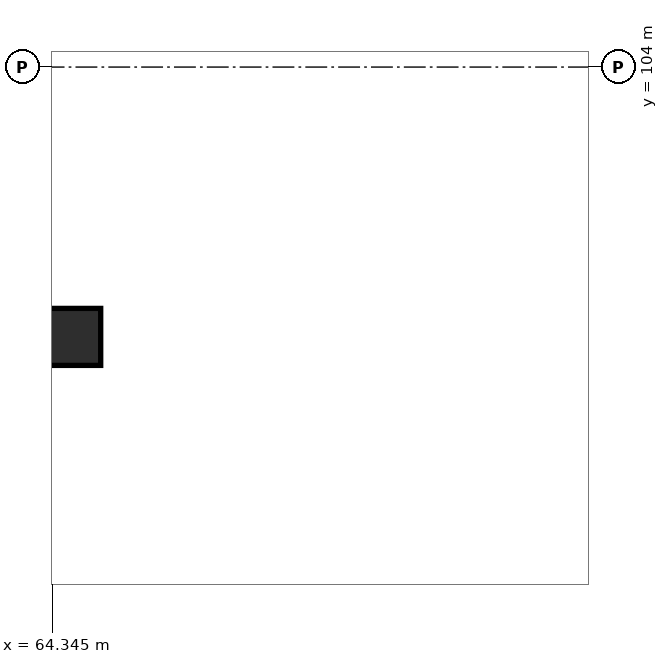
"""IFC4 building model, lengths in metres.
Left out: names, types, materials, properties, quantities, classifications, styles, units other than length and angle.
Written with IfcOpenShell. Run it as: python <this file> out.ifc"""

import sys

from ifc_helpers import new_model, si_unit, direction, frame, origin, origin_2d, place, context, subcontext, project, spatial, rectangle, extrude, element, save


model = new_model("IFC4")
c1 = context("Model", 3, precision=1e-05, world=origin(), true_north=direction((0.0, 1.0)))
c2 = subcontext(c1, "Body", "Model", "MODEL_VIEW")
j1 = project(units=[si_unit("LENGTHUNIT", "METRE"), si_unit("PLANEANGLEUNIT", "RADIAN")], contexts=[c1])
p1 = place(None, origin())
s1 = spatial("IfcSite", under=j1, at=p1, CompositionType="ELEMENT")
p2 = place(p1, origin())
s2 = spatial("IfcBuilding", under=s1, at=p2, CompositionType="ELEMENT")
p3 = place(p2, frame((0.0, 0.0, -3.84)))
s3 = spatial("IfcBuildingStorey", under=s2, at=p3, CompositionType="ELEMENT", Elevation=-3.84)
p4 = place(p3, frame((64.61, 100.45, 0.0), z_axis=(0.0, 0.0, 1.0), x_axis=(1.0, 0.0, 0.0)))
e1 = element("IfcColumn", 1, at=p4, inside=s3, PredefinedType="COLUMN", context=c2, shape_type="SweptSolid", body=[
    extrude(rectangle(XDim=0.75, YDim=0.75, at=origin_2d()), origin(), (0.0, 0.0, 1.0), 3.84),
])
save(model, sys.argv[1])
